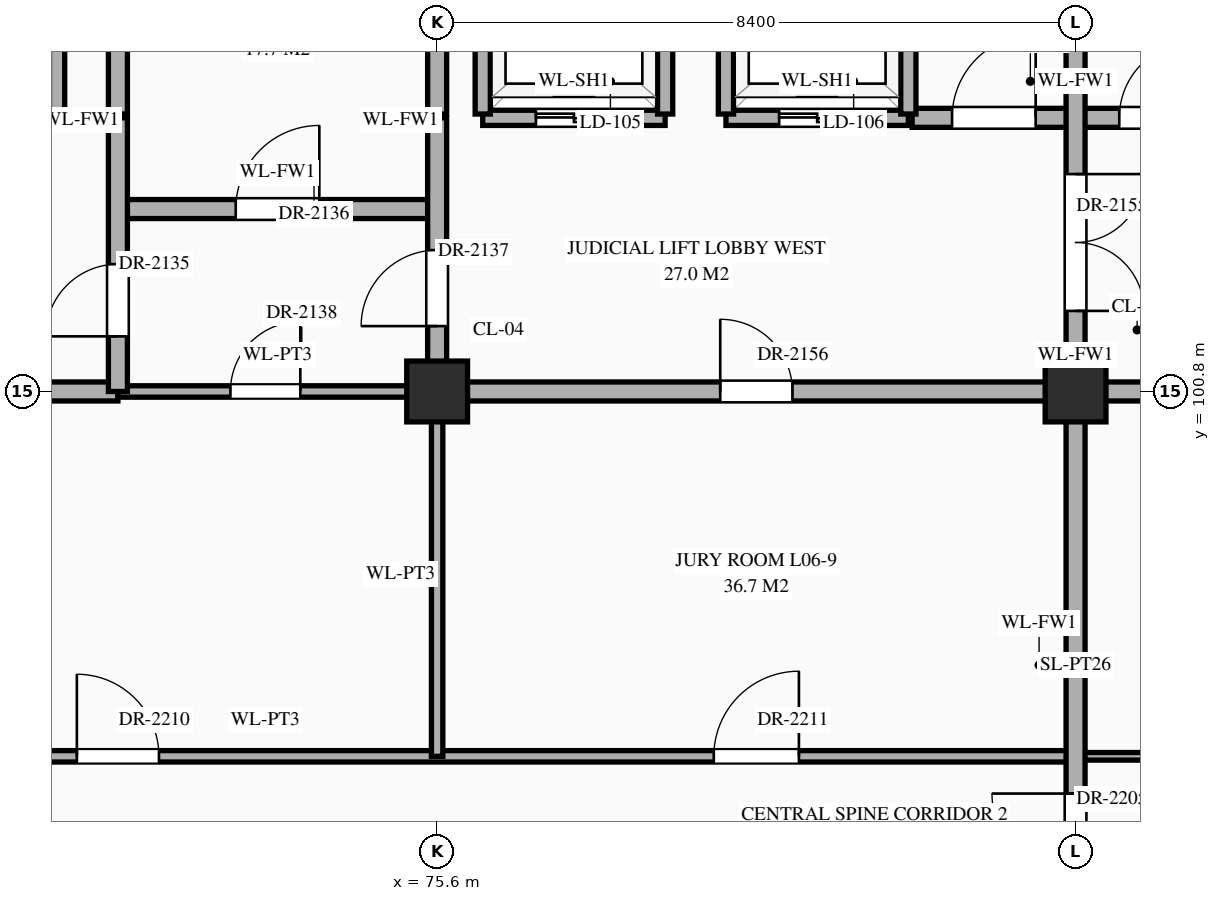
"""IFC4 building model, lengths in metres.
Left out: names, types, materials, properties, quantities, classifications, styles, units other than length and angle.
Written with IfcOpenShell. Run it as: python <this file> out.ifc"""

import sys

from ifc_helpers import new_model, si_unit, direction, frame, frame_2d, origin, origin_2d, place, context, subcontext, project, spatial, rectangle, extrude, element, fill, save


model = new_model("IFC4")
c1 = context("Model", 3, precision=1e-05, world=origin(), true_north=direction((0.0, 1.0)))
c2 = subcontext(c1, "Body", "Model", "MODEL_VIEW")
j1 = project(units=[si_unit("LENGTHUNIT", "METRE"), si_unit("PLANEANGLEUNIT", "RADIAN")], contexts=[c1])
p1 = place(None, origin())
s1 = spatial("IfcSite", under=j1, at=p1, CompositionType="ELEMENT")
p2 = place(p1, origin())
s2 = spatial("IfcBuilding", under=s1, at=p2, CompositionType="ELEMENT")
p3 = place(p2, frame((0.0, 0.0, 26.1)))
s3 = spatial("IfcBuildingStorey", under=s2, at=p3, CompositionType="ELEMENT", Elevation=26.1)
for number, where, z_axis, x_axis in (
    (1, (75.6, 100.8, 0.0), (0.0, 0.0, 1.0), (1.0, 0.0, 0.0)),
    (2, (84.0, 100.8, 0.0), (0.0, 0.0, 1.0), (1.0, 0.0, 0.0)),
):
    element("IfcColumn", number, at=place(p3, frame(where, z_axis=z_axis, x_axis=x_axis)), inside=s3, PredefinedType="COLUMN", context=c2, shape_type="SweptSolid", body=[
        extrude(rectangle(XDim=0.8, YDim=0.8, at=origin_2d()), origin(), (0.0, 0.0, 1.0), 4.5),
    ])
p4 = place(p3, frame((56.2, 96.0, 0.0), z_axis=(0.0, 0.0, 1.0), x_axis=(1.0, 0.0, 0.0)))
e3 = element("IfcWall", 3, at=p4, inside=s3, PredefinedType="STANDARD", context=c2, shape_type="SweptSolid", body=[
    extrude(rectangle(XDim=27.8, YDim=0.15, at=frame_2d((13.9, 0.0))), origin(), (0.0, 0.0, 1.0), 4.24),
])
p5 = place(p4, frame((0.8, 0.0, 0.0)))
e4 = element("IfcOpeningElement", 4, at=p5, cuts=e3, PredefinedType="OPENING", context=c2, shape_type="SweptSolid", body=[
    extrude(rectangle(XDim=1.0, YDim=2.25, at=frame_2d((0.5, 1.125))), frame((0.0, 0.087, 0.0), z_axis=(0.0, -1.0, 0.0), x_axis=(1.0, 0.0, 0.0)), (0.0, 0.0, 1.0), 0.174),
])
p6 = place(p4, frame((6.28, 0.0, 0.0)))
e5 = element("IfcOpeningElement", 5, at=p6, cuts=e3, PredefinedType="OPENING", context=c2, shape_type="SweptSolid", body=[
    extrude(rectangle(XDim=1.04, YDim=2.2, at=frame_2d((0.52, 1.1))), frame((0.0, 0.087, 0.0), z_axis=(0.0, -1.0, 0.0), x_axis=(1.0, 0.0, 0.0)), (0.0, 0.0, 1.0), 0.174),
])
p7 = place(p4, frame((14.66, 0.0, 0.0)))
e6 = element("IfcOpeningElement", 6, at=p7, cuts=e3, PredefinedType="OPENING", context=c2, shape_type="SweptSolid", body=[
    extrude(rectangle(XDim=1.08, YDim=2.25, at=frame_2d((0.54, 1.125))), frame((0.0, 0.087, 0.0), z_axis=(0.0, -1.0, 0.0), x_axis=(1.0, 0.0, 0.0)), (0.0, 0.0, 1.0), 0.174),
])
p8 = place(p4, frame((23.04, 0.0, 0.0)))
e7 = element("IfcOpeningElement", 7, at=p8, cuts=e3, PredefinedType="OPENING", context=c2, shape_type="SweptSolid", body=[
    extrude(rectangle(XDim=1.12, YDim=2.25, at=frame_2d((0.56, 1.125))), frame((0.0, 0.087, 0.0), z_axis=(0.0, -1.0, 0.0), x_axis=(1.0, 0.0, 0.0)), (0.0, 0.0, 1.0), 0.174),
])
p9 = place(p3, frame((84.0, 96.0, 0.0), z_axis=(0.0, 0.0, 1.0), x_axis=(1.0, 0.0, 0.0)))
e8 = element("IfcWall", 8, at=p9, inside=s3, PredefinedType="STANDARD", context=c2, shape_type="SweptSolid", body=[
    extrude(rectangle(XDim=5.8, YDim=0.1, at=frame_2d((2.9, 0.0))), origin(), (0.0, 0.0, 1.0), 4.24),
])
p10 = place(p9, frame((1.23, 0.0, 0.0)))
e9 = element("IfcOpeningElement", 9, at=p10, cuts=e8, PredefinedType="OPENING", context=c2, shape_type="SweptSolid", body=[
    extrude(rectangle(XDim=0.94, YDim=2.3, at=frame_2d((0.47, 1.15))), frame((0.0, 0.062, 0.0), z_axis=(0.0, -1.0, 0.0), x_axis=(1.0, 0.0, 0.0)), (0.0, 0.0, 1.0), 0.124),
])
p11 = place(p9, frame((4.11, 0.0, 0.0)))
e10 = element("IfcOpeningElement", 10, at=p11, cuts=e8, PredefinedType="OPENING", context=c2, shape_type="SweptSolid", body=[
    extrude(rectangle(XDim=0.98, YDim=2.35, at=frame_2d((0.49, 1.175))), frame((0.0, 0.062, 0.0), z_axis=(0.0, -1.0, 0.0), x_axis=(1.0, 0.0, 0.0)), (0.0, 0.0, 1.0), 0.124),
])
p12 = place(p3, frame((58.8, 100.8, 0.0), z_axis=(0.0, 0.0, 1.0), x_axis=(1.0, 0.0, 0.0)))
e11 = element("IfcWall", 11, at=p12, inside=s3, PredefinedType="STANDARD", context=c2, shape_type="SweptSolid", body=[
    extrude(rectangle(XDim=12.6, YDim=0.25, at=frame_2d((6.3, 0.0))), origin(), (0.0, 0.0, 1.0), 3.39),
])
p13 = place(p12, frame((3.7, 0.0, 0.0)))
e12 = element("IfcOpeningElement", 12, at=p13, cuts=e11, PredefinedType="OPENING", context=c2, shape_type="SweptSolid", body=[
    extrude(rectangle(XDim=1.0, YDim=2.2, at=frame_2d((0.5, 1.1))), frame((0.0, 0.137, 0.0), z_axis=(0.0, -1.0, 0.0), x_axis=(1.0, 0.0, 0.0)), (0.0, 0.0, 1.0), 0.274),
])
p14 = place(p3, frame((71.4, 100.8, 0.0), z_axis=(0.0, 0.0, 1.0), x_axis=(1.0, 0.0, 0.0)))
e13 = element("IfcWall", 13, at=p14, inside=s3, PredefinedType="STANDARD", context=c2, shape_type="SweptSolid", body=[
    extrude(rectangle(XDim=4.2, YDim=0.15, at=frame_2d((2.1, 0.0))), origin(), (0.0, 0.0, 1.0), 3.39),
])
p15 = place(p14, frame((1.48, 0.0, 0.0)))
e14 = element("IfcOpeningElement", 14, at=p15, cuts=e13, PredefinedType="OPENING", context=c2, shape_type="SweptSolid", body=[
    extrude(rectangle(XDim=0.92, YDim=2.15, at=frame_2d((0.46, 1.075))), frame((0.0, 0.087, 0.0), z_axis=(0.0, -1.0, 0.0), x_axis=(1.0, 0.0, 0.0)), (0.0, 0.0, 1.0), 0.174),
])
p16 = place(p3, frame((75.6, 100.8, 0.0), z_axis=(0.0, 0.0, 1.0), x_axis=(1.0, 0.0, 0.0)))
e15 = element("IfcWall", 15, at=p16, inside=s3, PredefinedType="STANDARD", context=c2, shape_type="SweptSolid", body=[
    extrude(rectangle(XDim=16.8, YDim=0.25, at=frame_2d((8.4, 0.0))), origin(), (0.0, 0.0, 1.0), 3.39),
])
p17 = place(p16, frame((3.725, 0.0, 0.0)))
e16 = element("IfcOpeningElement", 16, at=p17, cuts=e15, PredefinedType="OPENING", context=c2, shape_type="SweptSolid", body=[
    extrude(rectangle(XDim=0.95, YDim=2.15, at=frame_2d((0.475, 1.075))), frame((0.0, 0.137, 0.0), z_axis=(0.0, -1.0, 0.0), x_axis=(1.0, 0.0, 0.0)), (0.0, 0.0, 1.0), 0.274),
])
p18 = place(p16, frame((9.76, 0.0, 0.0)))
e17 = element("IfcOpeningElement", 17, at=p18, cuts=e15, PredefinedType="OPENING", context=c2, shape_type="SweptSolid", body=[
    extrude(rectangle(XDim=1.0, YDim=2.2, at=frame_2d((0.5, 1.1))), frame((0.0, 0.137, 0.0), z_axis=(0.0, -1.0, 0.0), x_axis=(1.0, 0.0, 0.0)), (0.0, 0.0, 1.0), 0.274),
])
p19 = place(p16, frame((12.525, 0.0, 0.0)))
e18 = element("IfcOpeningElement", 18, at=p19, cuts=e15, PredefinedType="OPENING", context=c2, shape_type="SweptSolid", body=[
    extrude(rectangle(XDim=0.95, YDim=2.15, at=frame_2d((0.475, 1.075))), frame((0.0, 0.137, 0.0), z_axis=(0.0, -1.0, 0.0), x_axis=(1.0, 0.0, 0.0)), (0.0, 0.0, 1.0), 0.274),
])
p20 = place(p16, frame((14.79, 0.0, 0.0)))
e19 = element("IfcOpeningElement", 19, at=p20, cuts=e15, PredefinedType="OPENING", context=c2, shape_type="SweptSolid", body=[
    extrude(rectangle(XDim=1.1, YDim=2.2, at=frame_2d((0.55, 1.1))), frame((0.0, 0.137, 0.0), z_axis=(0.0, -1.0, 0.0), x_axis=(1.0, 0.0, 0.0)), (0.0, 0.0, 1.0), 0.274),
])
p21 = place(p3, frame((71.4, 103.2, 0.0), z_axis=(0.0, 0.0, 1.0), x_axis=(1.0, 0.0, 0.0)))
e20 = element("IfcWall", 20, at=p21, inside=s3, PredefinedType="STANDARD", context=c2, shape_type="SweptSolid", body=[
    extrude(rectangle(XDim=4.2, YDim=0.25, at=frame_2d((2.1, 0.0))), origin(), (0.0, 0.0, 1.0), 4.24),
])
p22 = place(p21, frame((1.55, 0.0, 0.0)))
e21 = element("IfcOpeningElement", 21, at=p22, cuts=e20, PredefinedType="OPENING", context=c2, shape_type="SweptSolid", body=[
    extrude(rectangle(XDim=1.1, YDim=2.2, at=frame_2d((0.55, 1.1))), frame((0.0, 0.137, 0.0), z_axis=(0.0, -1.0, 0.0), x_axis=(1.0, 0.0, 0.0)), (0.0, 0.0, 1.0), 0.274),
])
p23 = place(p3, frame((67.6, 104.4, 0.0), z_axis=(0.0, 0.0, 1.0), x_axis=(1.0, 0.0, 0.0)))
e22 = element("IfcWall", 22, at=p23, inside=s3, PredefinedType="STANDARD", context=c2, shape_type="SweptSolid", body=[
    extrude(rectangle(XDim=3.0, YDim=0.2, at=frame_2d((1.5, 0.0))), origin(), (0.0, 0.0, 1.0), 4.24),
])
p24 = place(p23, frame((0.9, 0.0, 0.0)))
e23 = element("IfcOpeningElement", 23, at=p24, cuts=e22, PredefinedType="OPENING", context=c2, shape_type="SweptSolid", body=[
    extrude(rectangle(XDim=1.2, YDim=2.15, at=frame_2d((0.6, 1.075))), frame((0.0, 0.112, 0.0), z_axis=(0.0, -1.0, 0.0), x_axis=(1.0, 0.0, 0.0)), (0.0, 0.0, 1.0), 0.224),
])
p25 = place(p3, frame((76.2, 104.4, 0.0), z_axis=(0.0, 0.0, 1.0), x_axis=(1.0, 0.0, 0.0)))
e24 = element("IfcWall", 24, at=p25, inside=s3, PredefinedType="STANDARD", context=c2, shape_type="SweptSolid", body=[
    extrude(rectangle(XDim=2.4, YDim=0.2, at=frame_2d((1.2, 0.0))), origin(), (0.0, 0.0, 1.0), 4.24),
])
p26 = place(p25, frame((0.7, 0.0, 0.0)))
e25 = element("IfcOpeningElement", 25, at=p26, cuts=e24, PredefinedType="OPENING", context=c2, shape_type="SweptSolid", body=[
    extrude(rectangle(XDim=1.0, YDim=2.15, at=frame_2d((0.5, 1.075))), frame((0.0, 0.112, 0.0), z_axis=(0.0, -1.0, 0.0), x_axis=(1.0, 0.0, 0.0)), (0.0, 0.0, 1.0), 0.224),
])
p27 = place(p3, frame((79.4, 104.4, 0.0), z_axis=(0.0, 0.0, 1.0), x_axis=(1.0, 0.0, 0.0)))
e26 = element("IfcWall", 26, at=p27, inside=s3, PredefinedType="STANDARD", context=c2, shape_type="SweptSolid", body=[
    extrude(rectangle(XDim=2.4, YDim=0.2, at=frame_2d((1.2, 0.0))), origin(), (0.0, 0.0, 1.0), 4.24),
])
p28 = place(p27, frame((0.7, 0.0, 0.0)))
e27 = element("IfcOpeningElement", 27, at=p28, cuts=e26, PredefinedType="OPENING", context=c2, shape_type="SweptSolid", body=[
    extrude(rectangle(XDim=1.0, YDim=2.15, at=frame_2d((0.5, 1.075))), frame((0.0, 0.112, 0.0), z_axis=(0.0, -1.0, 0.0), x_axis=(1.0, 0.0, 0.0)), (0.0, 0.0, 1.0), 0.224),
])
p29 = place(p3, frame((81.85, 104.4, 0.0), z_axis=(0.0, 0.0, 1.0), x_axis=(1.0, 0.0, 0.0)))
e28 = element("IfcWall", 28, at=p29, inside=s3, PredefinedType="STANDARD", context=c2, shape_type="SweptSolid", body=[
    extrude(rectangle(XDim=4.3, YDim=0.25, at=frame_2d((2.15, 0.0))), origin(), (0.0, 0.0, 1.0), 4.24),
])
p30 = place(p29, frame((0.525, 0.0, 0.0)))
e29 = element("IfcOpeningElement", 29, at=p30, cuts=e28, PredefinedType="OPENING", context=c2, shape_type="SweptSolid", body=[
    extrude(rectangle(XDim=1.1, YDim=2.2, at=frame_2d((0.55, 1.1))), frame((0.0, 0.137, 0.0), z_axis=(0.0, -1.0, 0.0), x_axis=(1.0, 0.0, 0.0)), (0.0, 0.0, 1.0), 0.274),
])
p31 = place(p29, frame((2.725, 0.0, 0.0)))
e30 = element("IfcOpeningElement", 30, at=p31, cuts=e28, PredefinedType="OPENING", context=c2, shape_type="SweptSolid", body=[
    extrude(rectangle(XDim=1.0, YDim=2.2, at=frame_2d((0.5, 1.1))), frame((0.0, 0.137, 0.0), z_axis=(0.0, -1.0, 0.0), x_axis=(1.0, 0.0, 0.0)), (0.0, 0.0, 1.0), 0.274),
])
p32 = place(p3, frame((70.6, 104.45, 0.0), z_axis=(0.0, 0.0, 1.0), x_axis=(0.0, 1.0, 0.0)))
e31 = element("IfcWall", 31, at=p32, inside=s3, PredefinedType="STANDARD", context=c2, shape_type="SweptSolid", body=[
    extrude(rectangle(XDim=2.3, YDim=0.2, at=frame_2d((1.15, 0.0))), origin(), (0.0, 0.0, 1.0), 4.24),
])
p33 = place(p3, frame((71.4, 100.8, 0.0), z_axis=(0.0, 0.0, 1.0), x_axis=(0.0, 1.0, 0.0)))
e32 = element("IfcWall", 32, at=p33, inside=s3, PredefinedType="STANDARD", context=c2, shape_type="SweptSolid", body=[
    extrude(rectangle(XDim=3.6, YDim=0.25, at=frame_2d((1.8, 0.0))), origin(), (0.0, 0.0, 1.0), 3.89),
])
p34 = place(p33, frame((0.725, 0.0, 0.0)))
e33 = element("IfcOpeningElement", 33, at=p34, cuts=e32, PredefinedType="OPENING", context=c2, shape_type="SweptSolid", body=[
    extrude(rectangle(XDim=0.95, YDim=2.15, at=frame_2d((0.475, 1.075))), frame((0.0, 0.137, 0.0), z_axis=(0.0, -1.0, 0.0), x_axis=(1.0, 0.0, 0.0)), (0.0, 0.0, 1.0), 0.274),
])
p35 = place(p3, frame((71.4, 104.45, 0.0), z_axis=(0.0, 0.0, 1.0), x_axis=(0.0, 1.0, 0.0)))
e34 = element("IfcWall", 34, at=p35, inside=s3, PredefinedType="STANDARD", context=c2, shape_type="SweptSolid", body=[
    extrude(rectangle(XDim=3.5, YDim=0.25, at=frame_2d((1.75, 0.0))), origin(), (0.0, 0.0, 1.0), 3.89),
])
p36 = place(p3, frame((75.6, 96.0, 0.0), z_axis=(0.0, 0.0, 1.0), x_axis=(0.0, 1.0, 0.0)))
e35 = element("IfcWall", 35, at=p36, inside=s3, PredefinedType="STANDARD", context=c2, shape_type="SweptSolid", body=[
    extrude(rectangle(XDim=4.8, YDim=0.15, at=frame_2d((2.4, 0.0))), origin(), (0.0, 0.0, 1.0), 3.49),
])
p37 = place(p3, frame((75.6, 100.8, 0.0), z_axis=(0.0, 0.0, 1.0), x_axis=(0.0, 1.0, 0.0)))
e36 = element("IfcWall", 36, at=p37, inside=s3, PredefinedType="STANDARD", context=c2, shape_type="SweptSolid", body=[
    extrude(rectangle(XDim=3.6, YDim=0.25, at=frame_2d((1.8, 0.0))), origin(), (0.0, 0.0, 1.0), 3.49),
])
p38 = place(p37, frame((0.86, 0.0, 0.0)))
e37 = element("IfcOpeningElement", 37, at=p38, cuts=e36, PredefinedType="OPENING", context=c2, shape_type="SweptSolid", body=[
    extrude(rectangle(XDim=1.0, YDim=2.2, at=frame_2d((0.5, 1.1))), frame((0.0, 0.137, 0.0), z_axis=(0.0, -1.0, 0.0), x_axis=(1.0, 0.0, 0.0)), (0.0, 0.0, 1.0), 0.274),
])
p39 = place(p3, frame((75.6, 104.45, 0.0), z_axis=(0.0, 0.0, 1.0), x_axis=(0.0, 1.0, 0.0)))
e38 = element("IfcWall", 38, at=p39, inside=s3, PredefinedType="STANDARD", context=c2, shape_type="SweptSolid", body=[
    extrude(rectangle(XDim=3.5, YDim=0.25, at=frame_2d((1.75, 0.0))), origin(), (0.0, 0.0, 1.0), 3.49),
])
for number, where, z_axis, x_axis in (
    (39, (76.2, 104.45, 0.0), (0.0, 0.0, 1.0), (0.0, 1.0, 0.0)),
    (40, (78.6, 104.45, 0.0), (0.0, 0.0, 1.0), (0.0, 1.0, 0.0)),
    (41, (79.4, 104.45, 0.0), (0.0, 0.0, 1.0), (0.0, 1.0, 0.0)),
    (42, (81.8, 104.45, 0.0), (0.0, 0.0, 1.0), (0.0, 1.0, 0.0)),
):
    element("IfcWall", number, at=place(p3, frame(where, z_axis=z_axis, x_axis=x_axis)), inside=s3, PredefinedType="STANDARD", context=c2, shape_type="SweptSolid", body=[
        extrude(rectangle(XDim=2.3, YDim=0.2, at=frame_2d((1.15, 0.0))), origin(), (0.0, 0.0, 1.0), 4.24),
    ])
p40 = place(p3, frame((84.0, 79.24, 0.0), z_axis=(0.0, 0.0, 1.0), x_axis=(0.0, 1.0, 0.0)))
e43 = element("IfcWall", 43, at=p40, inside=s3, PredefinedType="STANDARD", context=c2, shape_type="SweptSolid", body=[
    extrude(rectangle(XDim=35.92, YDim=0.25, at=frame_2d((17.96, 0.0))), origin(), (0.0, 0.0, 1.0), 3.49),
])
p41 = place(p40, frame((22.62, 0.0, 0.0)))
e44 = element("IfcOpeningElement", 44, at=p41, cuts=e43, PredefinedType="OPENING", context=c2, shape_type="SweptSolid", body=[
    extrude(rectangle(XDim=1.8, YDim=2.35, at=frame_2d((0.9, 1.175))), frame((0.0, 0.137, 0.0), z_axis=(0.0, -1.0, 0.0), x_axis=(1.0, 0.0, 0.0)), (0.0, 0.0, 1.0), 0.274),
])
p42 = place(p40, frame((12.5, 0.0, 0.0)))
e45 = element("IfcOpeningElement", 45, at=p42, cuts=e43, PredefinedType="OPENING", context=c2, shape_type="SweptSolid", body=[
    extrude(rectangle(XDim=1.0, YDim=2.2, at=frame_2d((0.5, 1.1))), frame((0.0, 0.137, 0.0), z_axis=(0.0, -1.0, 0.0), x_axis=(1.0, 0.0, 0.0)), (0.0, 0.0, 1.0), 0.274),
])
p43 = place(p40, frame((15.17, 0.0, 0.0)))
e46 = element("IfcOpeningElement", 46, at=p43, cuts=e43, PredefinedType="OPENING", context=c2, shape_type="SweptSolid", body=[
    extrude(rectangle(XDim=1.1, YDim=2.2, at=frame_2d((0.55, 1.1))), frame((0.0, 0.137, 0.0), z_axis=(0.0, -1.0, 0.0), x_axis=(1.0, 0.0, 0.0)), (0.0, 0.0, 1.0), 0.274),
])
p44 = place(p40, frame((26.05, 0.0, 0.0)))
e47 = element("IfcOpeningElement", 47, at=p44, cuts=e43, PredefinedType="OPENING", context=c2, shape_type="SweptSolid", body=[
    extrude(rectangle(XDim=1.5, YDim=2.25, at=frame_2d((0.75, 1.125))), frame((0.0, 0.137, 0.0), z_axis=(0.0, -1.0, 0.0), x_axis=(1.0, 0.0, 0.0)), (0.0, 0.0, 1.0), 0.274),
])
p45 = place(p40, frame((29.645, 0.0, 0.0)))
e48 = element("IfcOpeningElement", 48, at=p45, cuts=e43, PredefinedType="OPENING", context=c2, shape_type="SweptSolid", body=[
    extrude(rectangle(XDim=0.95, YDim=2.15, at=frame_2d((0.475, 1.075))), frame((0.0, 0.137, 0.0), z_axis=(0.0, -1.0, 0.0), x_axis=(1.0, 0.0, 0.0)), (0.0, 0.0, 1.0), 0.274),
])
p46 = place(p40, frame((5.325, 0.0, 0.0)))
e49 = element("IfcOpeningElement", 49, at=p46, cuts=e43, PredefinedType="OPENING", context=c2, shape_type="SweptSolid", body=[
    extrude(rectangle(XDim=0.95, YDim=2.15, at=frame_2d((0.475, 1.075))), frame((0.0, 0.137, 0.0), z_axis=(0.0, -1.0, 0.0), x_axis=(1.0, 0.0, 0.0)), (0.0, 0.0, 1.0), 0.274),
])
p47 = place(p26, origin())
e50 = element("IfcDoor", 50, at=p47, inside=s3, OperationType="DOUBLE_DOOR_SLIDING", PredefinedType="DOOR", context=c2, shape_type="SweptSolid", body=[
    extrude(rectangle(XDim=1.0, YDim=2.15, at=frame_2d((0.5, 1.075))), frame((0.0, 0.025, 0.0), z_axis=(0.0, -1.0, 0.0), x_axis=(1.0, 0.0, 0.0)), (0.0, 0.0, 1.0), 0.05),
])
fill(e25, e50)
p48 = place(p28, origin())
e51 = element("IfcDoor", 51, at=p48, inside=s3, OperationType="DOUBLE_DOOR_SLIDING", PredefinedType="DOOR", context=c2, shape_type="SweptSolid", body=[
    extrude(rectangle(XDim=1.0, YDim=2.15, at=frame_2d((0.5, 1.075))), frame((0.0, 0.025, 0.0), z_axis=(0.0, -1.0, 0.0), x_axis=(1.0, 0.0, 0.0)), (0.0, 0.0, 1.0), 0.05),
])
fill(e27, e51)
p49 = place(p34, origin())
e52 = element("IfcDoor", 52, at=p49, inside=s3, OperationType="SINGLE_SWING_LEFT", PredefinedType="DOOR", context=c2, shape_type="SweptSolid", body=[
    extrude(rectangle(XDim=0.95, YDim=2.15, at=frame_2d((0.475, 1.075))), frame((0.0, 0.025, 0.0), z_axis=(0.0, -1.0, 0.0), x_axis=(1.0, 0.0, 0.0)), (0.0, 0.0, 1.0), 0.05),
])
fill(e33, e52)
p50 = place(p22, origin())
e53 = element("IfcDoor", 53, at=p50, inside=s3, OperationType="SINGLE_SWING_RIGHT", PredefinedType="DOOR", context=c2, shape_type="SweptSolid", body=[
    extrude(rectangle(XDim=1.1, YDim=2.2, at=frame_2d((0.55, 1.1))), frame((0.0, 0.025, 0.0), z_axis=(0.0, -1.0, 0.0), x_axis=(1.0, 0.0, 0.0)), (0.0, 0.0, 1.0), 0.05),
])
fill(e21, e53)
p51 = place(p38, origin())
e54 = element("IfcDoor", 54, at=p51, inside=s3, OperationType="SINGLE_SWING_LEFT", PredefinedType="DOOR", context=c2, shape_type="SweptSolid", body=[
    extrude(rectangle(XDim=1.0, YDim=2.2, at=frame_2d((0.5, 1.1))), frame((0.0, 0.025, 0.0), z_axis=(0.0, -1.0, 0.0), x_axis=(1.0, 0.0, 0.0)), (0.0, 0.0, 1.0), 0.05),
])
fill(e37, e54)
p52 = place(p15, origin())
e55 = element("IfcDoor", 55, at=p52, inside=s3, OperationType="SINGLE_SWING_RIGHT", PredefinedType="DOOR", context=c2, shape_type="SweptSolid", body=[
    extrude(rectangle(XDim=0.92, YDim=2.15, at=frame_2d((0.46, 1.075))), frame((0.0, 0.025, 0.0), z_axis=(0.0, -1.0, 0.0), x_axis=(1.0, 0.0, 0.0)), (0.0, 0.0, 1.0), 0.05),
])
fill(e14, e55)
p53 = place(p41, frame((1.8, 0.0, 0.0), z_axis=(0.0, 0.0, 1.0), x_axis=(-1.0, 0.0, 0.0)))
e56 = element("IfcDoor", 56, at=p53, inside=s3, OperationType="DOUBLE_DOOR_SINGLE_SWING", PredefinedType="DOOR", context=c2, shape_type="SweptSolid", body=[
    extrude(rectangle(XDim=1.8, YDim=2.35, at=frame_2d((0.9, 1.175))), frame((0.0, 0.025, 0.0), z_axis=(0.0, -1.0, 0.0), x_axis=(1.0, 0.0, 0.0)), (0.0, 0.0, 1.0), 0.05),
])
fill(e44, e56)
p54 = place(p17, origin())
e57 = element("IfcDoor", 57, at=p54, inside=s3, OperationType="SINGLE_SWING_LEFT", PredefinedType="DOOR", context=c2, shape_type="SweptSolid", body=[
    extrude(rectangle(XDim=0.95, YDim=2.15, at=frame_2d((0.475, 1.075))), frame((0.0, 0.025, 0.0), z_axis=(0.0, -1.0, 0.0), x_axis=(1.0, 0.0, 0.0)), (0.0, 0.0, 1.0), 0.05),
])
fill(e16, e57)
p55 = place(p30, origin())
e58 = element("IfcDoor", 58, at=p55, inside=s3, OperationType="SINGLE_SWING_RIGHT", PredefinedType="DOOR", context=c2, shape_type="SweptSolid", body=[
    extrude(rectangle(XDim=1.1, YDim=2.2, at=frame_2d((0.55, 1.1))), frame((0.0, 0.025, 0.0), z_axis=(0.0, -1.0, 0.0), x_axis=(1.0, 0.0, 0.0)), (0.0, 0.0, 1.0), 0.05),
])
fill(e29, e58)
p56 = place(p31, origin())
e59 = element("IfcDoor", 59, at=p56, inside=s3, OperationType="SINGLE_SWING_RIGHT", PredefinedType="DOOR", context=c2, shape_type="SweptSolid", body=[
    extrude(rectangle(XDim=1.0, YDim=2.2, at=frame_2d((0.5, 1.1))), frame((0.0, 0.025, 0.0), z_axis=(0.0, -1.0, 0.0), x_axis=(1.0, 0.0, 0.0)), (0.0, 0.0, 1.0), 0.05),
])
fill(e30, e59)
p57 = place(p43, origin())
e60 = element("IfcDoor", 60, at=p57, inside=s3, OperationType="SINGLE_SWING_RIGHT", PredefinedType="DOOR", context=c2, shape_type="SweptSolid", body=[
    extrude(rectangle(XDim=1.1, YDim=2.2, at=frame_2d((0.55, 1.1))), frame((0.0, 0.025, 0.0), z_axis=(0.0, -1.0, 0.0), x_axis=(1.0, 0.0, 0.0)), (0.0, 0.0, 1.0), 0.05),
])
fill(e46, e60)
p58 = place(p7, origin())
e61 = element("IfcDoor", 61, at=p58, inside=s3, OperationType="SINGLE_SWING_LEFT", PredefinedType="DOOR", context=c2, shape_type="SweptSolid", body=[
    extrude(rectangle(XDim=1.08, YDim=2.25, at=frame_2d((0.54, 1.125))), frame((0.0, 0.025, 0.0), z_axis=(0.0, -1.0, 0.0), x_axis=(1.0, 0.0, 0.0)), (0.0, 0.0, 1.0), 0.05),
])
fill(e6, e61)
p59 = place(p8, origin())
e62 = element("IfcDoor", 62, at=p59, inside=s3, OperationType="SINGLE_SWING_RIGHT", PredefinedType="DOOR", context=c2, shape_type="SweptSolid", body=[
    extrude(rectangle(XDim=1.12, YDim=2.25, at=frame_2d((0.56, 1.125))), frame((0.0, 0.025, 0.0), z_axis=(0.0, -1.0, 0.0), x_axis=(1.0, 0.0, 0.0)), (0.0, 0.0, 1.0), 0.05),
])
fill(e7, e62)
save(model, sys.argv[1])
